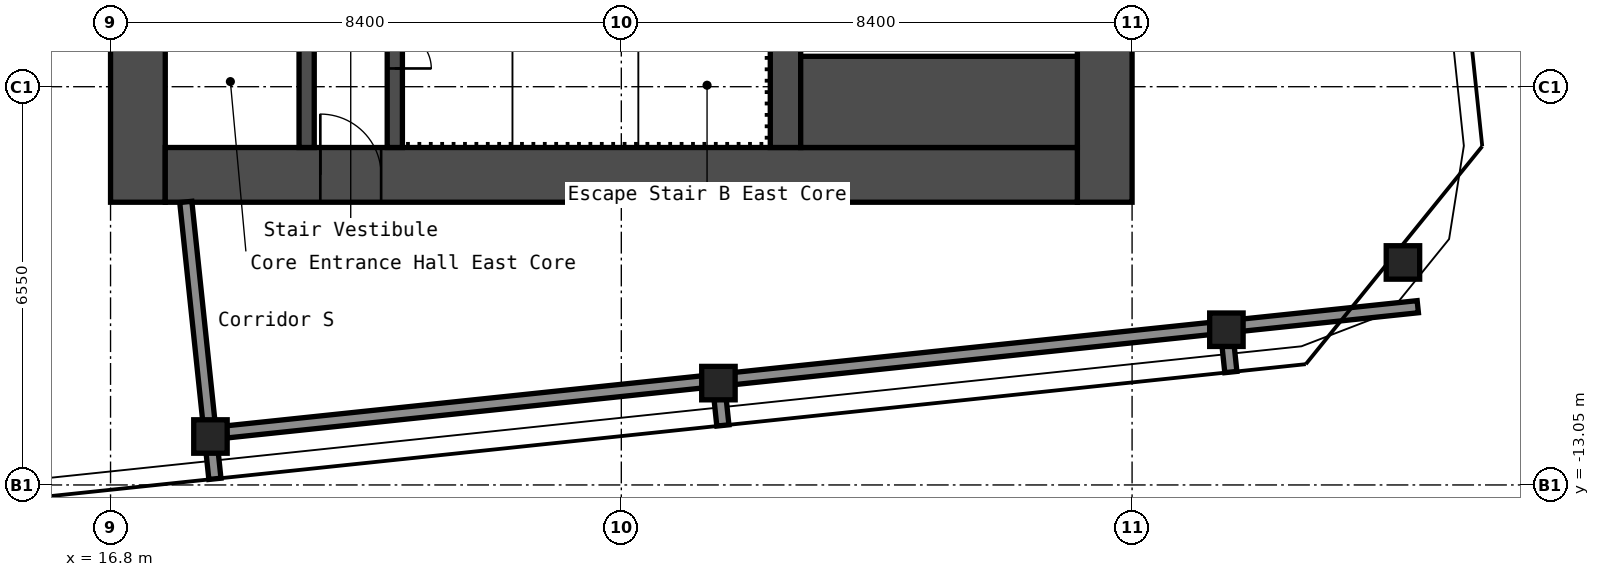
"""IFC4 building model, lengths in metres.
Left out: names, types, materials, properties, quantities, classifications, styles, units other than length and angle.
Written with IfcOpenShell. Run it as: python <this file> out.ifc"""

import sys

from ifc_helpers import new_model, si_unit, direction, frame, frame_2d, origin, origin_2d, place, context, subcontext, project, spatial, rectangle, hollow_rectangle, extrude, element, fill, save


model = new_model("IFC4")
c1 = context("Model", 3, precision=1e-05, world=origin(), true_north=direction((0.0, 1.0)))
c2 = subcontext(c1, "Body", "Model", "MODEL_VIEW")
j1 = project(units=[si_unit("LENGTHUNIT", "METRE"), si_unit("PLANEANGLEUNIT", "RADIAN")], contexts=[c1])
p1 = place(None, origin())
s1 = spatial("IfcSite", under=j1, at=p1, CompositionType="ELEMENT")
p2 = place(p1, origin())
s2 = spatial("IfcBuilding", under=s1, at=p2, CompositionType="ELEMENT")
p3 = place(p2, frame((0.0, 0.0, 239.0)))
s3 = spatial("IfcBuildingStorey", under=s2, at=p3, CompositionType="ELEMENT", Elevation=239.0)
for number, where, z_axis, x_axis in (
    (1, (18.443, -12.253, 0.0), (0.0, 0.0, 1.0), (1.0, 0.0, 0.0)),
    (2, (26.797, -11.375, 0.0), (0.0, 0.0, 1.0), (1.0, 0.0, 0.0)),
    (3, (35.151, -10.497, 0.0), (0.0, 0.0, 1.0), (1.0, 0.0, 0.0)),
    (4, (38.054, -9.39, 0.0), (0.0, 0.0, 1.0), (1.0, 0.0, 0.0)),
):
    element("IfcColumn", number, at=place(p3, frame(where, z_axis=z_axis, x_axis=x_axis)), inside=s3, PredefinedType="COLUMN", context=c2, shape_type="SweptSolid", body=[
        extrude(hollow_rectangle(XDim=0.55, YDim=0.55, WallThickness=0.022, InnerFilletRadius=0.033, OuterFilletRadius=0.055, at=origin_2d()), origin(), (0.0, 0.0, 1.0), 2.75),
    ])
p4 = place(p3, frame((17.25, -8.4, 0.0), z_axis=(0.0, 0.0, 1.0), x_axis=(0.0, 1.0, 0.0)))
e5 = element("IfcWall", 5, at=p4, inside=s3, PredefinedType="SHEAR", context=c2, shape_type="SweptSolid", body=[
    extrude(rectangle(XDim=16.8, YDim=0.9, at=frame_2d((8.4, 0.0))), origin(), (0.0, 0.0, 1.0), 2.75),
])
p5 = place(p4, frame((11.879, 0.0, 0.0)))
e6 = element("IfcOpeningElement", 6, at=p5, cuts=e5, PredefinedType="OPENING", context=c2, shape_type="SweptSolid", body=[
    extrude(rectangle(XDim=1.6, YDim=2.1, at=frame_2d((0.8, 1.05))), frame((0.0, 0.46, 0.0), z_axis=(0.0, -1.0, 0.0), x_axis=(1.0, 0.0, 0.0)), (0.0, 0.0, 1.0), 0.92),
])
p6 = place(p3, frame((33.15, -8.4, 0.0), z_axis=(0.0, 0.0, 1.0), x_axis=(0.0, 1.0, 0.0)))
e7 = element("IfcWall", 7, at=p6, inside=s3, PredefinedType="SHEAR", context=c2, shape_type="SweptSolid", body=[
    extrude(rectangle(XDim=16.8, YDim=0.9, at=frame_2d((8.4, 0.0))), origin(), (0.0, 0.0, 1.0), 2.75),
])
p7 = place(p3, frame((17.7, -7.95, 0.0), z_axis=(0.0, 0.0, 1.0), x_axis=(1.0, 0.0, 0.0)))
e8 = element("IfcWall", 8, at=p7, inside=s3, PredefinedType="SHEAR", context=c2, shape_type="SweptSolid", body=[
    extrude(rectangle(XDim=15.0, YDim=0.9, at=frame_2d((7.5, 0.0))), origin(), (0.0, 0.0, 1.0), 2.75),
])
p8 = place(p7, frame((2.55, 0.0, 0.0)))
e9 = element("IfcOpeningElement", 9, at=p8, cuts=e8, PredefinedType="OPENING", context=c2, shape_type="SweptSolid", body=[
    extrude(rectangle(XDim=1.0, YDim=2.1, at=frame_2d((0.5, 1.05))), frame((0.0, 0.46, 0.0), z_axis=(0.0, -1.0, 0.0), x_axis=(1.0, 0.0, 0.0)), (0.0, 0.0, 1.0), 0.92),
])
p9 = place(p3, frame((20.025, -7.5, 0.0), z_axis=(0.0, 0.0, 1.0), x_axis=(0.0, 1.0, 0.0)))
e10 = element("IfcWall", 10, at=p9, inside=s3, PredefinedType="SHEAR", context=c2, shape_type="SweptSolid", body=[
    extrude(rectangle(XDim=6.3, YDim=0.25, at=frame_2d((3.15, 0.0))), origin(), (0.0, 0.0, 1.0), 2.75),
])
p10 = place(p9, frame((2.4, 0.0, 0.0)))
e11 = element("IfcOpeningElement", 11, at=p10, cuts=e10, PredefinedType="OPENING", context=c2, shape_type="SweptSolid", body=[
    extrude(rectangle(XDim=1.0, YDim=2.1, at=frame_2d((0.5, 1.05))), frame((0.0, 0.135, 0.0), z_axis=(0.0, -1.0, 0.0), x_axis=(1.0, 0.0, 0.0)), (0.0, 0.0, 1.0), 0.27),
])
p11 = place(p3, frame((21.475, -7.5, 0.0), z_axis=(0.0, 0.0, 1.0), x_axis=(0.0, 1.0, 0.0)))
e12 = element("IfcWall", 12, at=p11, inside=s3, PredefinedType="SHEAR", context=c2, shape_type="SweptSolid", body=[
    extrude(rectangle(XDim=3.75, YDim=0.25, at=frame_2d((1.875, 0.0))), origin(), (0.0, 0.0, 1.0), 2.75),
])
p12 = place(p11, frame((1.3, 0.0, 0.0)))
e13 = element("IfcOpeningElement", 13, at=p12, cuts=e12, PredefinedType="OPENING", context=c2, shape_type="SweptSolid", body=[
    extrude(rectangle(XDim=1.2, YDim=2.1, at=frame_2d((0.6, 1.05))), frame((0.0, 0.135, 0.0), z_axis=(0.0, -1.0, 0.0), x_axis=(1.0, 0.0, 0.0)), (0.0, 0.0, 1.0), 0.27),
])
p13 = place(p3, frame((27.9, -7.5, 0.0), z_axis=(0.0, 0.0, 1.0), x_axis=(0.0, 1.0, 0.0)))
e14 = element("IfcWall", 14, at=p13, inside=s3, PredefinedType="SHEAR", context=c2, shape_type="SweptSolid", body=[
    extrude(rectangle(XDim=3.75, YDim=0.5, at=frame_2d((1.875, 0.0))), origin(), (0.0, 0.0, 1.0), 2.75),
])
p14 = place(p3, frame((28.15, -6.75, 0.0), z_axis=(0.0, 0.0, 1.0), x_axis=(1.0, 0.0, 0.0)))
e15 = element("IfcWall", 15, at=p14, inside=s3, PredefinedType="SHEAR", context=c2, shape_type="SweptSolid", body=[
    extrude(rectangle(XDim=4.55, YDim=1.5, at=frame_2d((2.275, 0.0))), origin(), (0.0, 0.0, 1.0), 2.75),
])
p15 = place(p3, frame((18.708, -12.177, 0.0), z_axis=(0.0, 0.0, 1.0), x_axis=(0.994521604238, 0.104531233147, 0.0)))
e16 = element("IfcWall", 16, at=p15, inside=s3, PredefinedType="PARTITIONING", context=c2, shape_type="SweptSolid", body=[
    extrude(rectangle(XDim=19.698, YDim=0.2, at=frame_2d((9.849, 0.0))), origin(), (0.0, 0.0, 1.0), 2.75),
])
p16 = place(p3, frame((18.516, -12.949, 0.0), z_axis=(0.0, 0.0, 1.0), x_axis=(-0.104548796268, 0.994519758074, 0.0)))
e17 = element("IfcWall", 17, at=p16, inside=s3, PredefinedType="PARTITIONING", context=c2, shape_type="SweptSolid", body=[
    extrude(rectangle(XDim=4.579, YDim=0.2, at=frame_2d((2.29, 0.0))), origin(), (0.0, 0.0, 1.0), 2.75),
])
for number, where, z_axis, x_axis in (
    (18, (26.87, -12.071, 0.0), (0.0, 0.0, 1.0), (-0.105, 0.994, 0.0)),
    (19, (35.224, -11.193, 0.0), (0.0, 0.0, 1.0), (-0.105, 0.994, 0.0)),
):
    element("IfcWall", number, at=place(p3, frame(where, z_axis=z_axis, x_axis=x_axis)), inside=s3, PredefinedType="PARTITIONING", context=c2, shape_type="SweptSolid", body=[
        extrude(rectangle(XDim=0.434, YDim=0.2, at=frame_2d((0.217, 0.0))), origin(), (0.0, 0.0, 1.0), 2.75),
    ])
p17 = place(p8, origin())
e20 = element("IfcDoor", 20, at=p17, inside=s3, OperationType="SINGLE_SWING_RIGHT", PredefinedType="DOOR", context=c2, shape_type="SweptSolid", body=[
    extrude(rectangle(XDim=1.0, YDim=2.1, at=frame_2d((0.5, 1.05))), frame((0.0, 0.025, 0.0), z_axis=(0.0, -1.0, 0.0), x_axis=(1.0, 0.0, 0.0)), (0.0, 0.0, 1.0), 0.05),
])
fill(e9, e20)
p18 = place(p12, origin())
e21 = element("IfcDoor", 21, at=p18, inside=s3, OperationType="DOUBLE_DOOR_SINGLE_SWING", PredefinedType="DOOR", context=c2, shape_type="SweptSolid", body=[
    extrude(rectangle(XDim=1.2, YDim=2.1, at=frame_2d((0.6, 1.05))), frame((0.0, 0.025, 0.0), z_axis=(0.0, -1.0, 0.0), x_axis=(1.0, 0.0, 0.0)), (0.0, 0.0, 1.0), 0.05),
])
fill(e13, e21)
save(model, sys.argv[1])
